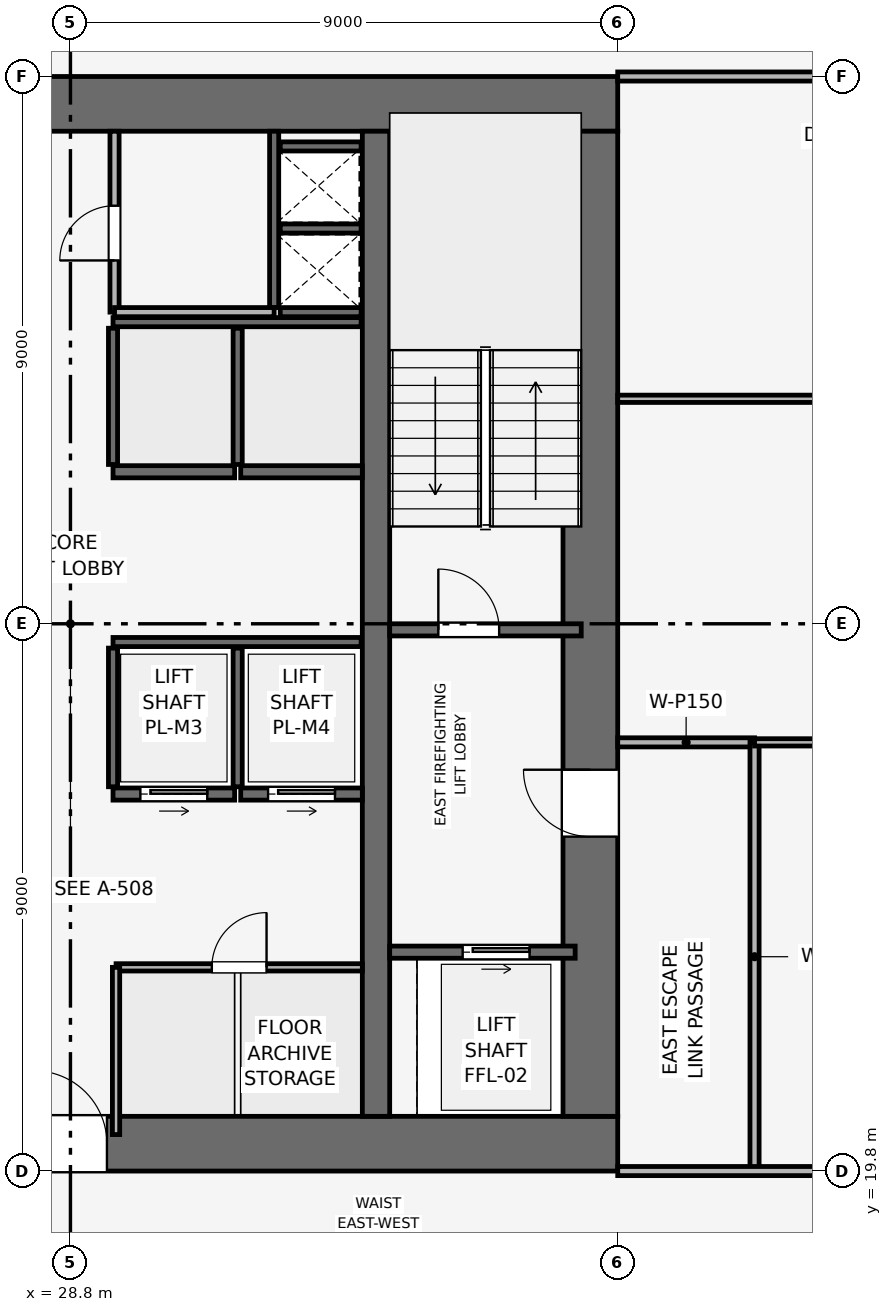
"""IFC4 building model, lengths in metres.
Left out: names, types, materials, properties, quantities, classifications, styles, units other than length and angle.
Written with IfcOpenShell. Run it as: python <this file> out.ifc"""

import sys

from ifc_helpers import new_model, si_unit, direction, frame, frame_2d, origin, place, context, subcontext, project, spatial, rectangle, extrude, element, fill, save


model = new_model("IFC4")
c1 = context("Model", 3, precision=1e-05, world=origin(), true_north=direction((0.0, 1.0)))
c2 = subcontext(c1, "Body", "Model", "MODEL_VIEW")
j1 = project(units=[si_unit("LENGTHUNIT", "METRE"), si_unit("PLANEANGLEUNIT", "RADIAN")], contexts=[c1])
p1 = place(None, origin())
s1 = spatial("IfcSite", under=j1, at=p1, CompositionType="ELEMENT")
p2 = place(p1, origin())
s2 = spatial("IfcBuilding", under=s1, at=p2, CompositionType="ELEMENT")
p3 = place(p2, frame((0.0, 0.0, 168.3)))
s3 = spatial("IfcBuildingStorey", under=s2, at=p3, CompositionType="ELEMENT", Elevation=168.3)
p4 = place(p3, frame((19.8, 20.25, 0.0), z_axis=(0.0, 0.0, 1.0), x_axis=(1.0, 0.0, 0.0)))
e1 = element("IfcWall", 1, at=p4, inside=s3, PredefinedType="SHEAR", context=c2, shape_type="SweptSolid", body=[
    extrude(rectangle(XDim=18.0, YDim=0.9, at=frame_2d((9.0, 0.0))), origin(), (0.0, 0.0, 1.0), 3.75),
])
p5 = place(p4, frame((8.4, 0.0, 0.0)))
e2 = element("IfcOpeningElement", 2, at=p5, cuts=e1, PredefinedType="OPENING", context=c2, shape_type="SweptSolid", body=[
    extrude(rectangle(XDim=1.2, YDim=2.2, at=frame_2d((0.6, 1.1))), frame((0.0, 0.46, 0.0), z_axis=(0.0, -1.0, 0.0), x_axis=(1.0, 0.0, 0.0)), (0.0, 0.0, 1.0), 0.92),
])
p6 = place(p3, frame((19.8, 37.35, 0.0), z_axis=(0.0, 0.0, 1.0), x_axis=(1.0, 0.0, 0.0)))
e3 = element("IfcWall", 3, at=p6, inside=s3, PredefinedType="SHEAR", context=c2, shape_type="SweptSolid", body=[
    extrude(rectangle(XDim=18.0, YDim=0.9, at=frame_2d((9.0, 0.0))), origin(), (0.0, 0.0, 1.0), 3.75),
])
p7 = place(p6, frame((7.05, 0.0, 0.0)))
e4 = element("IfcOpeningElement", 4, at=p7, cuts=e3, PredefinedType="OPENING", context=c2, shape_type="SweptSolid", body=[
    extrude(rectangle(XDim=1.1, YDim=2.15, at=frame_2d((0.55, 1.075))), frame((0.0, 0.46, 0.0), z_axis=(0.0, -1.0, 0.0), x_axis=(1.0, 0.0, 0.0)), (0.0, 0.0, 1.0), 0.92),
])
p8 = place(p3, frame((37.35, 20.7, 0.0), z_axis=(0.0, 0.0, 1.0), x_axis=(0.0, 1.0, 0.0)))
e5 = element("IfcWall", 5, at=p8, inside=s3, PredefinedType="SHEAR", context=c2, shape_type="SweptSolid", body=[
    extrude(rectangle(XDim=16.2, YDim=0.9, at=frame_2d((8.1, 0.0))), origin(), (0.0, 0.0, 1.0), 3.75),
])
p9 = place(p8, frame((4.6, 0.0, 0.0)))
e6 = element("IfcOpeningElement", 6, at=p9, cuts=e5, PredefinedType="OPENING", context=c2, shape_type="SweptSolid", body=[
    extrude(rectangle(XDim=1.1, YDim=2.15, at=frame_2d((0.55, 1.075))), frame((0.0, 0.46, 0.0), z_axis=(0.0, -1.0, 0.0), x_axis=(1.0, 0.0, 0.0)), (0.0, 0.0, 1.0), 0.92),
])
p10 = place(p3, frame((33.825, 20.7, 0.0), z_axis=(0.0, 0.0, 1.0), x_axis=(0.0, 1.0, 0.0)))
e7 = element("IfcWall", 7, at=p10, inside=s3, PredefinedType="SHEAR", context=c2, shape_type="SweptSolid", body=[
    extrude(rectangle(XDim=16.2, YDim=0.45, at=frame_2d((8.1, 0.0))), origin(), (0.0, 0.0, 1.0), 3.75),
])
p11 = place(p3, frame((34.05, 28.7, 0.0), z_axis=(0.0, 0.0, 1.0), x_axis=(1.0, 0.0, 0.0)))
e8 = element("IfcWall", 8, at=p11, inside=s3, PredefinedType="SHEAR", context=c2, shape_type="SweptSolid", body=[
    extrude(rectangle(XDim=3.15, YDim=0.2, at=frame_2d((1.575, 0.0))), origin(), (0.0, 0.0, 1.0), 3.495),
])
p12 = place(p11, frame((0.8, 0.0, 0.0)))
e9 = element("IfcOpeningElement", 9, at=p12, cuts=e8, PredefinedType="OPENING", context=c2, shape_type="SweptSolid", body=[
    extrude(rectangle(XDim=1.0, YDim=2.1, at=frame_2d((0.5, 1.05))), frame((0.0, 0.11, 0.0), z_axis=(0.0, -1.0, 0.0), x_axis=(1.0, 0.0, 0.0)), (0.0, 0.0, 1.0), 0.22),
])
p13 = place(p3, frame((32.15, 34.0, 0.0), z_axis=(0.0, 0.0, 1.0), x_axis=(0.0, 1.0, 0.0)))
e10 = element("IfcWall", 10, at=p13, inside=s3, PredefinedType="SHEAR", context=c2, shape_type="SweptSolid", body=[
    extrude(rectangle(XDim=2.9, YDim=0.15, at=frame_2d((1.45, 0.0))), origin(), (0.0, 0.0, 1.0), 3.495),
])
for number, where, z_axis, x_axis in (
    (11, (32.25, 33.925, 0.0), (0.0, 0.0, 1.0), (1.0, 0.0, 0.0)),
    (12, (32.25, 35.3, 0.0), (0.0, 0.0, 1.0), (1.0, 0.0, 0.0)),
):
    element("IfcWall", number, at=place(p3, frame(where, z_axis=z_axis, x_axis=x_axis)), inside=s3, PredefinedType="SHEAR", context=c2, shape_type="SweptSolid", body=[
        extrude(rectangle(XDim=1.33, YDim=0.15, at=frame_2d((0.665, 0.0))), origin(), (0.0, 0.0, 1.0), 3.495),
    ])
p14 = place(p3, frame((34.05, 23.4, 0.0), z_axis=(0.0, 0.0, 1.0), x_axis=(1.0, 0.0, 0.0)))
e13 = element("IfcWall", 13, at=p14, inside=s3, PredefinedType="SHEAR", context=c2, shape_type="SweptSolid", body=[
    extrude(rectangle(XDim=3.05, YDim=0.2, at=frame_2d((1.525, 0.0))), origin(), (0.0, 0.0, 1.0), 3.495),
])
p15 = place(p14, frame((1.2, 0.0, 0.0)))
e14 = element("IfcOpeningElement", 14, at=p15, cuts=e13, PredefinedType="OPENING", context=c2, shape_type="SweptSolid", body=[
    extrude(rectangle(XDim=1.1, YDim=2.15, at=frame_2d((0.55, 1.075))), frame((0.0, 0.11, 0.0), z_axis=(0.0, -1.0, 0.0), x_axis=(1.0, 0.0, 0.0)), (0.0, 0.0, 1.0), 0.22),
])
p16 = place(p3, frame((29.5, 26.0, 0.0), z_axis=(0.0, 0.0, 1.0), x_axis=(1.0, 0.0, 0.0)))
e15 = element("IfcWall", 15, at=p16, inside=s3, PredefinedType="SHEAR", context=c2, shape_type="SweptSolid", body=[
    extrude(rectangle(XDim=2.0, YDim=0.2, at=frame_2d((1.0, 0.0))), origin(), (0.0, 0.0, 1.0), 3.495),
])
p17 = place(p16, frame((0.45, 0.0, 0.0)))
e16 = element("IfcOpeningElement", 16, at=p17, cuts=e15, PredefinedType="OPENING", context=c2, shape_type="SweptSolid", body=[
    extrude(rectangle(XDim=1.1, YDim=2.15, at=frame_2d((0.55, 1.075))), frame((0.0, 0.11, 0.0), z_axis=(0.0, -1.0, 0.0), x_axis=(1.0, 0.0, 0.0)), (0.0, 0.0, 1.0), 0.22),
])
p18 = place(p3, frame((31.6, 26.0, 0.0), z_axis=(0.0, 0.0, 1.0), x_axis=(1.0, 0.0, 0.0)))
e17 = element("IfcWall", 17, at=p18, inside=s3, PredefinedType="SHEAR", context=c2, shape_type="SweptSolid", body=[
    extrude(rectangle(XDim=2.0, YDim=0.2, at=frame_2d((1.0, 0.0))), origin(), (0.0, 0.0, 1.0), 3.495),
])
p19 = place(p18, frame((0.45, 0.0, 0.0)))
e18 = element("IfcOpeningElement", 18, at=p19, cuts=e17, PredefinedType="OPENING", context=c2, shape_type="SweptSolid", body=[
    extrude(rectangle(XDim=1.1, YDim=2.15, at=frame_2d((0.55, 1.075))), frame((0.0, 0.11, 0.0), z_axis=(0.0, -1.0, 0.0), x_axis=(1.0, 0.0, 0.0)), (0.0, 0.0, 1.0), 0.22),
])
for number, where, z_axis, x_axis in (
    (19, (29.5, 31.3, 0.0), (0.0, 0.0, 1.0), (1.0, 0.0, 0.0)),
    (20, (31.6, 31.3, 0.0), (0.0, 0.0, 1.0), (1.0, 0.0, 0.0)),
):
    element("IfcWall", number, at=place(p3, frame(where, z_axis=z_axis, x_axis=x_axis)), inside=s3, PredefinedType="SHEAR", context=c2, shape_type="SweptSolid", body=[
        extrude(rectangle(XDim=2.0, YDim=0.2, at=frame_2d((1.0, 0.0))), origin(), (0.0, 0.0, 1.0), 3.495),
    ])
p20 = place(p3, frame((32.25, 36.65, 0.0), z_axis=(0.0, 0.0, 1.0), x_axis=(1.0, 0.0, 0.0)))
e21 = element("IfcWall", 21, at=p20, inside=s3, PredefinedType="SHEAR", context=c2, shape_type="SweptSolid", body=[
    extrude(rectangle(XDim=1.33, YDim=0.15, at=frame_2d((0.665, 0.0))), origin(), (0.0, 0.0, 1.0), 3.495),
])
p21 = place(p3, frame((29.5, 28.5, 0.0), z_axis=(0.0, 0.0, 1.0), x_axis=(1.0, 0.0, 0.0)))
e22 = element("IfcWall", 22, at=p21, inside=s3, PredefinedType="SHEAR", context=c2, shape_type="SweptSolid", body=[
    extrude(rectangle(XDim=4.08, YDim=0.15, at=frame_2d((2.04, 0.0))), origin(), (0.0, 0.0, 1.0), 3.495),
])
for number, where, z_axis, x_axis in (
    (23, (29.5, 26.12, 0.0), (0.0, 0.0, 1.0), (0.0, 1.0, 0.0)),
    (24, (31.55, 26.12, 0.0), (0.0, 0.0, 1.0), (0.0, 1.0, 0.0)),
):
    element("IfcWall", number, at=place(p3, frame(where, z_axis=z_axis, x_axis=x_axis)), inside=s3, PredefinedType="SHEAR", context=c2, shape_type="SweptSolid", body=[
        extrude(rectangle(XDim=2.28, YDim=0.15, at=frame_2d((1.14, 0.0))), origin(), (0.0, 0.0, 1.0), 3.495),
    ])
p22 = place(p3, frame((29.5, 33.76, 0.0), z_axis=(0.0, 0.0, 1.0), x_axis=(1.0, 0.0, 0.0)))
e25 = element("IfcWall", 25, at=p22, inside=s3, PredefinedType="SHEAR", context=c2, shape_type="SweptSolid", body=[
    extrude(rectangle(XDim=4.08, YDim=0.15, at=frame_2d((2.04, 0.0))), origin(), (0.0, 0.0, 1.0), 3.495),
])
for number, where, z_axis, x_axis in (
    (26, (29.5, 31.42, 0.0), (0.0, 0.0, 1.0), (0.0, 1.0, 0.0)),
    (27, (31.55, 31.42, 0.0), (0.0, 0.0, 1.0), (0.0, 1.0, 0.0)),
):
    element("IfcWall", number, at=place(p3, frame(where, z_axis=z_axis, x_axis=x_axis)), inside=s3, PredefinedType="SHEAR", context=c2, shape_type="SweptSolid", body=[
        extrude(rectangle(XDim=2.24, YDim=0.15, at=frame_2d((1.12, 0.0))), origin(), (0.0, 0.0, 1.0), 3.495),
    ])
p23 = place(p3, frame((29.525, 33.925, 0.0), z_axis=(0.0, 0.0, 1.0), x_axis=(0.0, 1.0, 0.0)))
e28 = element("IfcWall", 28, at=p23, inside=s3, PredefinedType="PARTITIONING", context=c2, shape_type="SweptSolid", body=[
    extrude(rectangle(XDim=2.975, YDim=0.15, at=frame_2d((1.487, 0.0))), origin(), (0.0, 0.0, 1.0), 3.495),
])
p24 = place(p23, frame((0.85, 0.0, 0.0)))
e29 = element("IfcOpeningElement", 29, at=p24, cuts=e28, PredefinedType="OPENING", context=c2, shape_type="SweptSolid", body=[
    extrude(rectangle(XDim=0.9, YDim=2.1, at=frame_2d((0.45, 1.05))), frame((0.0, 0.085, 0.0), z_axis=(0.0, -1.0, 0.0), x_axis=(1.0, 0.0, 0.0)), (0.0, 0.0, 1.0), 0.17),
])
p25 = place(p3, frame((29.525, 33.925, 0.0), z_axis=(0.0, 0.0, 1.0), x_axis=(1.0, 0.0, 0.0)))
e30 = element("IfcWall", 30, at=p25, inside=s3, PredefinedType="PARTITIONING", context=c2, shape_type="SweptSolid", body=[
    extrude(rectangle(XDim=2.625, YDim=0.15, at=frame_2d((1.312, 0.0))), origin(), (0.0, 0.0, 1.0), 3.495),
])
p26 = place(p3, frame((29.55, 23.15, 0.0), z_axis=(0.0, 0.0, 1.0), x_axis=(1.0, 0.0, 0.0)))
e31 = element("IfcWall", 31, at=p26, inside=s3, PredefinedType="PARTITIONING", context=c2, shape_type="SweptSolid", body=[
    extrude(rectangle(XDim=4.05, YDim=0.12, at=frame_2d((2.025, 0.0))), origin(), (0.0, 0.0, 1.0), 3.495),
])
p27 = place(p26, frame((1.575, 0.0, 0.0)))
e32 = element("IfcOpeningElement", 32, at=p27, cuts=e31, PredefinedType="OPENING", context=c2, shape_type="SweptSolid", body=[
    extrude(rectangle(XDim=0.9, YDim=2.1, at=frame_2d((0.45, 1.05))), frame((0.0, 0.07, 0.0), z_axis=(0.0, -1.0, 0.0), x_axis=(1.0, 0.0, 0.0)), (0.0, 0.0, 1.0), 0.14),
])
p28 = place(p3, frame((29.55, 20.4, 0.0), z_axis=(0.0, 0.0, 1.0), x_axis=(0.0, 1.0, 0.0)))
e33 = element("IfcWall", 33, at=p28, inside=s3, PredefinedType="PARTITIONING", context=c2, shape_type="SweptSolid", body=[
    extrude(rectangle(XDim=2.75, YDim=0.12, at=frame_2d((1.375, 0.0))), origin(), (0.0, 0.0, 1.0), 3.495),
])
p29 = place(p3, frame((37.8, 26.85, 0.0), z_axis=(0.0, 0.0, 1.0), x_axis=(1.0, 0.0, 0.0)))
e34 = element("IfcWall", 34, at=p29, inside=s3, PredefinedType="PARTITIONING", context=c2, shape_type="SweptSolid", body=[
    extrude(rectangle(XDim=2.25, YDim=0.15, at=frame_2d((1.125, 0.0))), origin(), (0.0, 0.0, 1.0), 3.495),
])
p30 = place(p3, frame((40.05, 19.8, 0.0), z_axis=(0.0, 0.0, 1.0), x_axis=(0.0, 1.0, 0.0)))
e35 = element("IfcWall", 35, at=p30, inside=s3, PredefinedType="PARTITIONING", context=c2, shape_type="SweptSolid", body=[
    extrude(rectangle(XDim=7.05, YDim=0.15, at=frame_2d((3.525, 0.0))), origin(), (0.0, 0.0, 1.0), 3.03),
])
p31 = place(p3, frame((40.05, 26.85, 0.0), z_axis=(0.0, 0.0, 1.0), x_axis=(1.0, 0.0, 0.0)))
e36 = element("IfcWall", 36, at=p31, inside=s3, PredefinedType="PARTITIONING", context=c2, shape_type="SweptSolid", body=[
    extrude(rectangle(XDim=12.92, YDim=0.12, at=frame_2d((6.46, 0.0))), origin(), (0.0, 0.0, 1.0), 2.98),
])
p32 = place(p31, frame((6.01, 0.0, 0.0)))
e37 = element("IfcOpeningElement", 37, at=p32, cuts=e36, PredefinedType="OPENING", context=c2, shape_type="SweptSolid", body=[
    extrude(rectangle(XDim=0.9, YDim=2.1, at=frame_2d((0.45, 1.05))), frame((0.0, 0.07, 0.0), z_axis=(0.0, -1.0, 0.0), x_axis=(1.0, 0.0, 0.0)), (0.0, 0.0, 1.0), 0.14),
])
p33 = place(p3, frame((37.8, 32.5, 0.0), z_axis=(0.0, 0.0, 1.0), x_axis=(1.0, 0.0, 0.0)))
e38 = element("IfcWall", 38, at=p33, inside=s3, PredefinedType="PARTITIONING", context=c2, shape_type="SweptSolid", body=[
    extrude(rectangle(XDim=15.17, YDim=0.12, at=frame_2d((7.585, 0.0))), origin(), (0.0, 0.0, 1.0), 2.98),
])
p34 = place(p3, frame((37.8, 19.8, 0.0), z_axis=(0.0, 0.0, 1.0), x_axis=(1.0, 0.0, 0.0)))
e39 = element("IfcWall", 39, at=p34, inside=s3, PredefinedType="PARTITIONING", context=c2, shape_type="SweptSolid", body=[
    extrude(rectangle(XDim=15.17, YDim=0.15, at=frame_2d((7.585, 0.0))), origin(), (0.0, 0.0, 1.0), 2.98),
])
p35 = place(p34, frame((4.4, 0.0, 0.0)))
e40 = element("IfcOpeningElement", 40, at=p35, cuts=e39, PredefinedType="OPENING", context=c2, shape_type="SweptSolid", body=[
    extrude(rectangle(XDim=0.9, YDim=2.1, at=frame_2d((0.45, 1.05))), frame((0.0, 0.085, 0.0), z_axis=(0.0, -1.0, 0.0), x_axis=(1.0, 0.0, 0.0)), (0.0, 0.0, 1.0), 0.17),
])
p36 = place(p3, frame((37.8, 37.8, 0.0), z_axis=(0.0, 0.0, 1.0), x_axis=(1.0, 0.0, 0.0)))
e41 = element("IfcWall", 41, at=p36, inside=s3, PredefinedType="PARTITIONING", context=c2, shape_type="SweptSolid", body=[
    extrude(rectangle(XDim=15.17, YDim=0.15, at=frame_2d((7.585, 0.0))), origin(), (0.0, 0.0, 1.0), 2.98),
])
p37 = place(p36, frame((3.4, 0.0, 0.0)))
e42 = element("IfcOpeningElement", 42, at=p37, cuts=e41, PredefinedType="OPENING", context=c2, shape_type="SweptSolid", body=[
    extrude(rectangle(XDim=0.9, YDim=2.1, at=frame_2d((0.45, 1.05))), frame((0.0, 0.085, 0.0), z_axis=(0.0, -1.0, 0.0), x_axis=(1.0, 0.0, 0.0)), (0.0, 0.0, 1.0), 0.17),
])
p38 = place(p12, origin())
e43 = element("IfcDoor", 43, at=p38, inside=s3, OperationType="SINGLE_SWING_LEFT", PredefinedType="DOOR", context=c2, shape_type="SweptSolid", body=[
    extrude(rectangle(XDim=1.0, YDim=2.1, at=frame_2d((0.5, 1.05))), frame((0.0, 0.025, 0.0), z_axis=(0.0, -1.0, 0.0), x_axis=(1.0, 0.0, 0.0)), (0.0, 0.0, 1.0), 0.05),
])
fill(e9, e43)
p39 = place(p15, origin())
e44 = element("IfcDoor", 44, at=p39, inside=s3, OperationType="SLIDING_TO_RIGHT", PredefinedType="DOOR", context=c2, shape_type="SweptSolid", body=[
    extrude(rectangle(XDim=1.1, YDim=2.15, at=frame_2d((0.55, 1.075))), frame((0.0, 0.025, 0.0), z_axis=(0.0, -1.0, 0.0), x_axis=(1.0, 0.0, 0.0)), (0.0, 0.0, 1.0), 0.05),
])
fill(e14, e44)
p40 = place(p17, origin())
e45 = element("IfcDoor", 45, at=p40, inside=s3, OperationType="SLIDING_TO_RIGHT", PredefinedType="DOOR", context=c2, shape_type="SweptSolid", body=[
    extrude(rectangle(XDim=1.1, YDim=2.15, at=frame_2d((0.55, 1.075))), frame((0.0, 0.025, 0.0), z_axis=(0.0, -1.0, 0.0), x_axis=(1.0, 0.0, 0.0)), (0.0, 0.0, 1.0), 0.05),
])
fill(e16, e45)
p41 = place(p19, origin())
e46 = element("IfcDoor", 46, at=p41, inside=s3, OperationType="SLIDING_TO_RIGHT", PredefinedType="DOOR", context=c2, shape_type="SweptSolid", body=[
    extrude(rectangle(XDim=1.1, YDim=2.15, at=frame_2d((0.55, 1.075))), frame((0.0, 0.025, 0.0), z_axis=(0.0, -1.0, 0.0), x_axis=(1.0, 0.0, 0.0)), (0.0, 0.0, 1.0), 0.05),
])
fill(e18, e46)
p42 = place(p24, origin())
e47 = element("IfcDoor", 47, at=p42, inside=s3, OperationType="SINGLE_SWING_LEFT", PredefinedType="DOOR", context=c2, shape_type="SweptSolid", body=[
    extrude(rectangle(XDim=0.9, YDim=2.1, at=frame_2d((0.45, 1.05))), frame((0.0, 0.025, 0.0), z_axis=(0.0, -1.0, 0.0), x_axis=(1.0, 0.0, 0.0)), (0.0, 0.0, 1.0), 0.05),
])
fill(e29, e47)
p43 = place(p27, origin())
e48 = element("IfcDoor", 48, at=p43, inside=s3, OperationType="SINGLE_SWING_RIGHT", PredefinedType="DOOR", context=c2, shape_type="SweptSolid", body=[
    extrude(rectangle(XDim=0.9, YDim=2.1, at=frame_2d((0.45, 1.05))), frame((0.0, 0.025, 0.0), z_axis=(0.0, -1.0, 0.0), x_axis=(1.0, 0.0, 0.0)), (0.0, 0.0, 1.0), 0.05),
])
fill(e32, e48)
p44 = place(p9, origin())
e49 = element("IfcDoor", 49, at=p44, inside=s3, OperationType="SINGLE_SWING_RIGHT", PredefinedType="DOOR", context=c2, shape_type="SweptSolid", body=[
    extrude(rectangle(XDim=1.1, YDim=2.15, at=frame_2d((0.55, 1.075))), frame((0.0, 0.025, 0.0), z_axis=(0.0, -1.0, 0.0), x_axis=(1.0, 0.0, 0.0)), (0.0, 0.0, 1.0), 0.05),
])
fill(e6, e49)
p45 = place(p5, origin())
e50 = element("IfcDoor", 50, at=p45, inside=s3, OperationType="SINGLE_SWING_LEFT", PredefinedType="DOOR", context=c2, shape_type="SweptSolid", body=[
    extrude(rectangle(XDim=1.2, YDim=2.2, at=frame_2d((0.6, 1.1))), frame((0.0, 0.025, 0.0), z_axis=(0.0, -1.0, 0.0), x_axis=(1.0, 0.0, 0.0)), (0.0, 0.0, 1.0), 0.05),
])
fill(e2, e50)
save(model, sys.argv[1])
